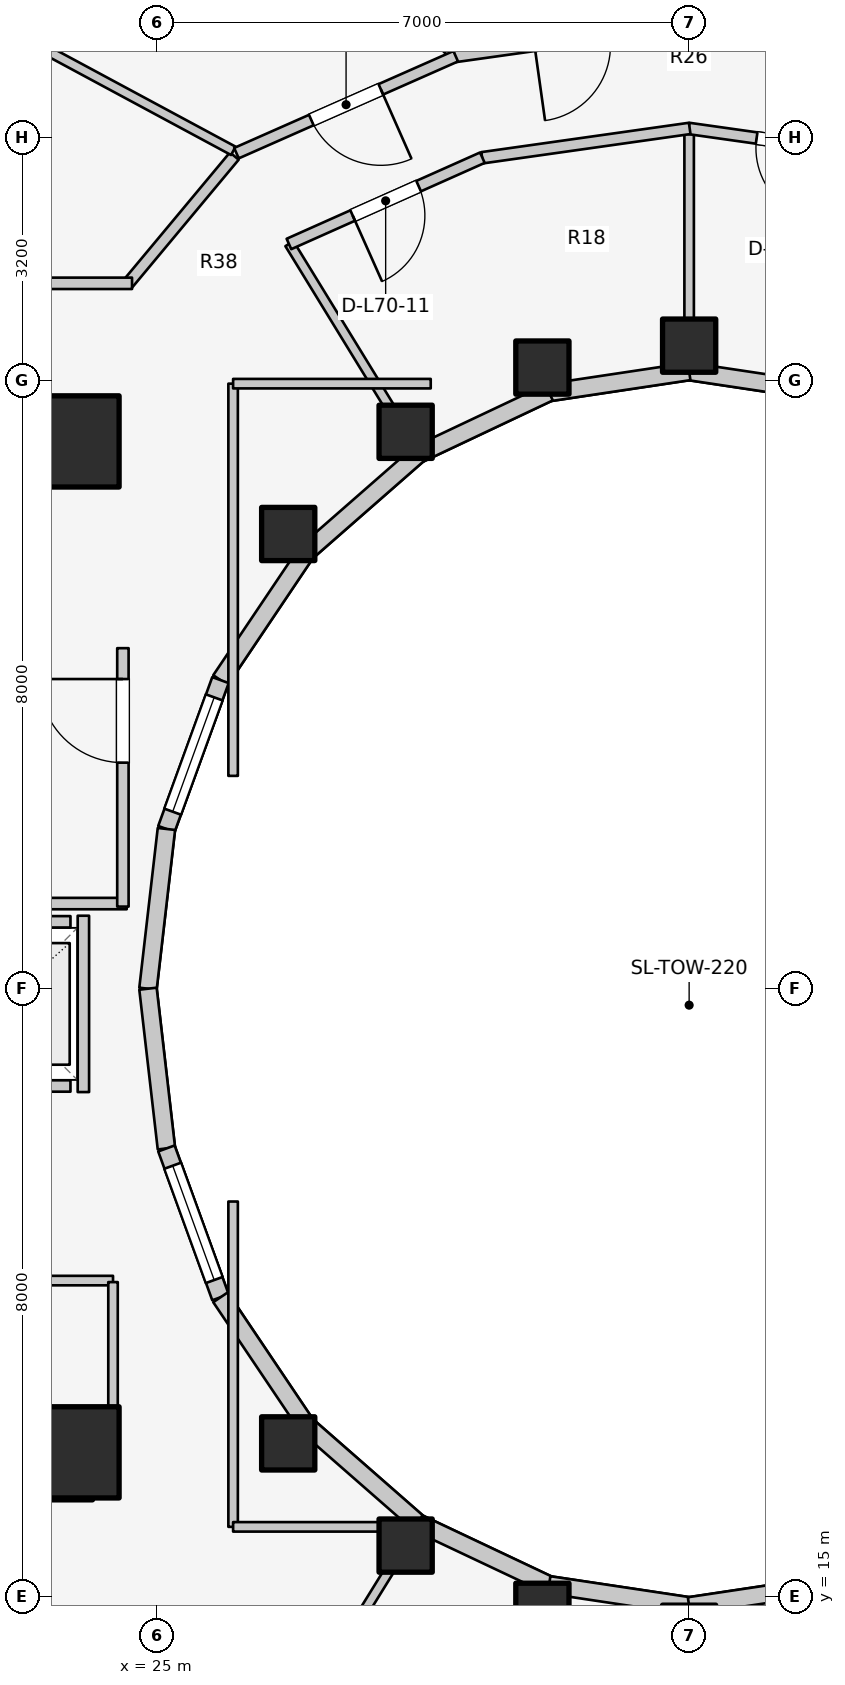
"""IFC4 building model, lengths in metres.
Left out: names, types, materials, properties, quantities, classifications, styles, units other than length and angle.
Written with IfcOpenShell. Run it as: python <this file> out.ifc"""

import sys

from ifc_helpers import new_model, si_unit, direction, frame, frame_2d, origin, origin_2d, place, context, subcontext, project, spatial, rectangle, extrude, element, fill, save


model = new_model("IFC4")
c1 = context("Model", 3, precision=1e-05, world=origin(), true_north=direction((0.0, 1.0)))
c2 = subcontext(c1, "Body", "Model", "MODEL_VIEW")
j1 = project(units=[si_unit("LENGTHUNIT", "METRE"), si_unit("PLANEANGLEUNIT", "RADIAN")], contexts=[c1])
p1 = place(None, origin())
s1 = spatial("IfcSite", under=j1, at=p1, CompositionType="ELEMENT")
p2 = place(p1, origin())
s2 = spatial("IfcBuilding", under=s1, at=p2, CompositionType="ELEMENT")
p3 = place(p2, frame((0.0, 0.0, 229.5)))
s3 = spatial("IfcBuildingStorey", under=s2, at=p3, CompositionType="ELEMENT", Elevation=229.5)
for number, where, z_axis, x_axis in (
    (1, (19.65, 16.55, 0.0), (0.0, 0.0, 1.0), (1.0, 0.0, 0.0)),
    (2, (19.65, 30.35, 0.0), (0.0, 0.0, 1.0), (1.0, 0.0, 0.0)),
):
    element("IfcWall", number, at=place(p3, frame(where, z_axis=z_axis, x_axis=x_axis)), inside=s3, PredefinedType="SHEAR", context=c2, shape_type="SweptSolid", body=[
        extrude(rectangle(XDim=4.5, YDim=0.55, at=frame_2d((2.25, 0.0))), origin(), (0.0, 0.0, 1.0), 3.1),
    ])
for number, where, z_axis, x_axis in (
    (3, (23.9, 16.9, 0.0), (0.0, 0.0, 1.0), (1.0, 0.0, 0.0)),
    (4, (23.9, 30.2, 0.0), (0.0, 0.0, 1.0), (1.0, 0.0, 0.0)),
):
    element("IfcColumn", number, at=place(p3, frame(where, z_axis=z_axis, x_axis=x_axis)), inside=s3, PredefinedType="COLUMN", context=c2, shape_type="SweptSolid", body=[
        extrude(rectangle(XDim=1.2, YDim=1.2, at=origin_2d()), origin(), (0.0, 0.0, 1.0), 3.1),
    ])
for number, where, z_axis, x_axis in (
    (5, (32.0, 31.46, 0.0), (0.0, 0.0, 1.0), (1.0, 0.0, 0.0)),
    (6, (30.069, 31.172, 0.0), (0.0, 0.0, 1.0), (1.0, 0.0, 0.0)),
    (7, (28.27, 30.327, 0.0), (0.0, 0.0, 1.0), (1.0, 0.0, 0.0)),
    (8, (26.725, 28.982, 0.0), (0.0, 0.0, 1.0), (1.0, 0.0, 0.0)),
    (9, (26.725, 17.018, 0.0), (0.0, 0.0, 1.0), (1.0, 0.0, 0.0)),
    (10, (28.27, 15.673, 0.0), (0.0, 0.0, 1.0), (1.0, 0.0, 0.0)),
    (11, (30.069, 14.828, 0.0), (0.0, 0.0, 1.0), (1.0, 0.0, 0.0)),
    (12, (32.0, 14.54, 0.0), (0.0, 0.0, 1.0), (1.0, 0.0, 0.0)),
):
    element("IfcColumn", number, at=place(p3, frame(where, z_axis=z_axis, x_axis=x_axis)), inside=s3, PredefinedType="COLUMN", context=c2, shape_type="SweptSolid", body=[
        extrude(rectangle(XDim=0.7, YDim=0.7, at=origin_2d()), origin(), (0.0, 0.0, 1.0), 3.1),
    ])
for number, where, z_axis, x_axis in (
    (13, (33.843, 30.843, 0.0), (0.0, 0.0, 1.0), (-0.989, 0.149, 0.0)),
    (14, (32.0, 31.12, 0.0), (0.0, 0.0, 1.0), (-0.989, -0.149, 0.0)),
):
    element("IfcWall", number, at=place(p3, frame(where, z_axis=z_axis, x_axis=x_axis)), inside=s3, PredefinedType="STANDARD", context=c2, shape_type="SweptSolid", body=[
        extrude(rectangle(XDim=1.864, YDim=0.23, at=frame_2d((0.932, 0.0))), origin(), (0.0, 0.0, 1.0), 2.16),
    ])
p4 = place(p3, frame((30.157, 30.843, 0.0), z_axis=(0.0, 0.0, 1.0), x_axis=(-0.904179699603, -0.427152280606, 0.0)))
e15 = element("IfcWall", 15, at=p4, inside=s3, PredefinedType="STANDARD", context=c2, shape_type="SweptSolid", body=[
    extrude(rectangle(XDim=1.899, YDim=0.23, at=frame_2d((0.95, 0.0))), origin(), (0.0, 0.0, 1.0), 2.16),
])
p5 = place(p3, frame((28.44, 30.032, 0.0), z_axis=(0.0, 0.0, 1.0), x_axis=(-0.752576694707, -0.658504607869, 0.0)))
e16 = element("IfcWall", 16, at=p5, inside=s3, PredefinedType="STANDARD", context=c2, shape_type="SweptSolid", body=[
    extrude(rectangle(XDim=1.959, YDim=0.23, at=frame_2d((0.98, 0.0))), origin(), (0.0, 0.0, 1.0), 2.16),
])
p6 = place(p3, frame((26.965, 28.742, 0.0), z_axis=(0.0, 0.0, 1.0), x_axis=(-0.558197800898, -0.829707909492, 0.0)))
e17 = element("IfcWall", 17, at=p6, inside=s3, PredefinedType="STANDARD", context=c2, shape_type="SweptSolid", body=[
    extrude(rectangle(XDim=2.027, YDim=0.23, at=frame_2d((1.013, 0.0))), origin(), (0.0, 0.0, 1.0), 2.16),
])
p7 = place(p3, frame((25.834, 27.06, 0.0), z_axis=(0.0, 0.0, 1.0), x_axis=(-0.341423187295, -0.93990968033, 0.0)))
e18 = element("IfcWall", 18, at=p7, inside=s3, PredefinedType="STANDARD", context=c2, shape_type="SweptSolid", body=[
    extrude(rectangle(XDim=2.084, YDim=0.23, at=frame_2d((1.042, 0.0))), origin(), (0.0, 0.0, 1.0), 2.84),
])
p8 = place(p7, frame((0.242, 0.0, 0.85)))
e19 = element("IfcOpeningElement", 19, at=p8, cuts=e18, PredefinedType="OPENING", context=c2, shape_type="SweptSolid", body=[
    extrude(rectangle(XDim=1.6, YDim=1.65, at=frame_2d((0.8, 0.825))), frame((0.0, 0.125, 0.0), z_axis=(0.0, -1.0, 0.0), x_axis=(1.0, 0.0, 0.0)), (0.0, 0.0, 1.0), 0.25),
])
for number, where, z_axis, x_axis in (
    (20, (25.123, 25.102, 0.0), (0.0, 0.0, 1.0), (-0.115, -0.993, 0.0)),
    (21, (24.88, 23.0, 0.0), (0.0, 0.0, 1.0), (0.115, -0.993, 0.0)),
):
    element("IfcWall", number, at=place(p3, frame(where, z_axis=z_axis, x_axis=x_axis)), inside=s3, PredefinedType="STANDARD", context=c2, shape_type="SweptSolid", body=[
        extrude(rectangle(XDim=2.115, YDim=0.23, at=frame_2d((1.058, 0.0))), origin(), (0.0, 0.0, 1.0), 2.84),
    ])
p9 = place(p3, frame((25.123, 20.898, 0.0), z_axis=(0.0, 0.0, 1.0), x_axis=(0.341423187295, -0.93990968033, 0.0)))
e22 = element("IfcWall", 22, at=p9, inside=s3, PredefinedType="STANDARD", context=c2, shape_type="SweptSolid", body=[
    extrude(rectangle(XDim=2.084, YDim=0.23, at=frame_2d((1.042, 0.0))), origin(), (0.0, 0.0, 1.0), 2.84),
])
p10 = place(p9, frame((0.242, 0.0, 0.85)))
e23 = element("IfcOpeningElement", 23, at=p10, cuts=e22, PredefinedType="OPENING", context=c2, shape_type="SweptSolid", body=[
    extrude(rectangle(XDim=1.6, YDim=1.65, at=frame_2d((0.8, 0.825))), frame((0.0, 0.125, 0.0), z_axis=(0.0, -1.0, 0.0), x_axis=(1.0, 0.0, 0.0)), (0.0, 0.0, 1.0), 0.25),
])
p11 = place(p3, frame((25.834, 18.94, 0.0), z_axis=(0.0, 0.0, 1.0), x_axis=(0.558197800898, -0.829707909492, 0.0)))
e24 = element("IfcWall", 24, at=p11, inside=s3, PredefinedType="STANDARD", context=c2, shape_type="SweptSolid", body=[
    extrude(rectangle(XDim=2.027, YDim=0.23, at=frame_2d((1.013, 0.0))), origin(), (0.0, 0.0, 1.0), 2.16),
])
p12 = place(p3, frame((26.965, 17.258, 0.0), z_axis=(0.0, 0.0, 1.0), x_axis=(0.752576694707, -0.658504607869, 0.0)))
e25 = element("IfcWall", 25, at=p12, inside=s3, PredefinedType="STANDARD", context=c2, shape_type="SweptSolid", body=[
    extrude(rectangle(XDim=1.959, YDim=0.23, at=frame_2d((0.98, 0.0))), origin(), (0.0, 0.0, 1.0), 2.16),
])
p13 = place(p3, frame((28.44, 15.968, 0.0), z_axis=(0.0, 0.0, 1.0), x_axis=(0.904179699603, -0.427152280606, 0.0)))
e26 = element("IfcWall", 26, at=p13, inside=s3, PredefinedType="STANDARD", context=c2, shape_type="SweptSolid", body=[
    extrude(rectangle(XDim=1.899, YDim=0.23, at=frame_2d((0.95, 0.0))), origin(), (0.0, 0.0, 1.0), 2.16),
])
for number, where, z_axis, x_axis in (
    (27, (30.157, 15.157, 0.0), (0.0, 0.0, 1.0), (0.989, -0.149, 0.0)),
    (28, (32.0, 14.88, 0.0), (0.0, 0.0, 1.0), (0.989, 0.149, 0.0)),
):
    element("IfcWall", number, at=place(p3, frame(where, z_axis=z_axis, x_axis=x_axis)), inside=s3, PredefinedType="STANDARD", context=c2, shape_type="SweptSolid", body=[
        extrude(rectangle(XDim=1.864, YDim=0.23, at=frame_2d((0.932, 0.0))), origin(), (0.0, 0.0, 1.0), 2.16),
    ])
p14 = place(p3, frame((22.04, 21.72, 0.0), z_axis=(0.0, 0.0, 1.0), x_axis=(1.0, 0.0, 0.0)))
e29 = element("IfcWall", 29, at=p14, inside=s3, PredefinedType="SOLIDWALL", context=c2, shape_type="SweptSolid", body=[
    extrude(rectangle(XDim=1.82, YDim=0.15, at=frame_2d((0.91, 0.0))), origin(), (0.0, 0.0, 1.0), 2.12),
])
p15 = place(p14, frame((0.36, 0.0, 0.0)))
e30 = element("IfcOpeningElement", 30, at=p15, cuts=e29, PredefinedType="OPENING", context=c2, shape_type="SweptSolid", body=[
    extrude(rectangle(XDim=1.1, YDim=2.1, at=frame_2d((0.55, 1.05))), frame((0.0, 0.085, 0.0), z_axis=(0.0, -1.0, 0.0), x_axis=(1.0, 0.0, 0.0)), (0.0, 0.0, 1.0), 0.17),
])
p16 = place(p3, frame((22.04, 23.88, 0.0), z_axis=(0.0, 0.0, 1.0), x_axis=(1.0, 0.0, 0.0)))
e31 = element("IfcWall", 31, at=p16, inside=s3, PredefinedType="SOLIDWALL", context=c2, shape_type="SweptSolid", body=[
    extrude(rectangle(XDim=1.82, YDim=0.15, at=frame_2d((0.91, 0.0))), origin(), (0.0, 0.0, 1.0), 2.12),
])
p17 = place(p3, frame((24.03, 21.64, 0.0), z_axis=(0.0, 0.0, 1.0), x_axis=(0.0, 1.0, 0.0)))
e32 = element("IfcWall", 32, at=p17, inside=s3, PredefinedType="SOLIDWALL", context=c2, shape_type="SweptSolid", body=[
    extrude(rectangle(XDim=2.32, YDim=0.15, at=frame_2d((1.16, 0.0))), origin(), (0.0, 0.0, 1.0), 2.12),
])
p18 = place(p3, frame((19.52, 24.12, 0.0), z_axis=(0.0, 0.0, 1.0), x_axis=(1.0, 0.0, 0.0)))
e33 = element("IfcWall", 33, at=p18, inside=s3, PredefinedType="PARTITIONING", context=c2, shape_type="SweptSolid", body=[
    extrude(rectangle(XDim=5.08, YDim=0.15, at=frame_2d((2.54, 0.0))), origin(), (0.0, 0.0, 1.0), 2.12),
])
p19 = place(p3, frame((24.55, 24.08, 0.0), z_axis=(0.0, 0.0, 1.0), x_axis=(0.0, 1.0, 0.0)))
e34 = element("IfcWall", 34, at=p19, inside=s3, PredefinedType="PARTITIONING", context=c2, shape_type="SweptSolid", body=[
    extrude(rectangle(XDim=3.4, YDim=0.15, at=frame_2d((1.7, 0.0))), origin(), (0.0, 0.0, 1.0), 2.855),
])
p20 = place(p19, frame((1.894, 0.0, 0.0)))
e35 = element("IfcOpeningElement", 35, at=p20, cuts=e34, PredefinedType="OPENING", context=c2, shape_type="SweptSolid", body=[
    extrude(rectangle(XDim=1.1, YDim=2.1, at=frame_2d((0.55, 1.05))), frame((0.0, 0.085, 0.0), z_axis=(0.0, -1.0, 0.0), x_axis=(1.0, 0.0, 0.0)), (0.0, 0.0, 1.0), 0.17),
])
p21 = place(p3, frame((19.55, 19.16, 0.0), z_axis=(0.0, 0.0, 1.0), x_axis=(1.0, 0.0, 0.0)))
e36 = element("IfcWall", 36, at=p21, inside=s3, PredefinedType="PARTITIONING", context=c2, shape_type="SweptSolid", body=[
    extrude(rectangle(XDim=4.87, YDim=0.125, at=frame_2d((2.435, 0.0))), origin(), (0.0, 0.0, 1.0), 2.12),
])
p22 = place(p21, frame((2.272, 0.0, 0.0)))
e37 = element("IfcOpeningElement", 37, at=p22, cuts=e36, PredefinedType="OPENING", context=c2, shape_type="SweptSolid", body=[
    extrude(rectangle(XDim=0.85, YDim=2.05, at=frame_2d((0.425, 1.025))), frame((0.0, 0.073, 0.0), z_axis=(0.0, -1.0, 0.0), x_axis=(1.0, 0.0, 0.0)), (0.0, 0.0, 1.0), 0.145),
])
p23 = place(p3, frame((24.42, 17.1, 0.0), z_axis=(0.0, 0.0, 1.0), x_axis=(0.0, 1.0, 0.0)))
e38 = element("IfcWall", 38, at=p23, inside=s3, PredefinedType="PARTITIONING", context=c2, shape_type="SweptSolid", body=[
    extrude(rectangle(XDim=2.04, YDim=0.125, at=frame_2d((1.02, 0.0))), origin(), (0.0, 0.0, 1.0), 2.232),
])
p24 = place(p3, frame((32.0, 31.1, 0.0), z_axis=(0.0, 0.0, 1.0), x_axis=(0.0, 1.0, 0.0)))
e39 = element("IfcWall", 39, at=p24, inside=s3, PredefinedType="PARTITIONING", context=c2, shape_type="SweptSolid", body=[
    extrude(rectangle(XDim=3.218, YDim=0.125, at=frame_2d((1.609, 0.0))), origin(), (0.0, 0.0, 1.0), 2.376),
])
p25 = place(p3, frame((28.45, 30.015, 0.0), z_axis=(0.0, 0.0, 1.0), x_axis=(-0.522763432117, 0.852477796802, 0.0)))
e40 = element("IfcWall", 40, at=p25, inside=s3, PredefinedType="PARTITIONING", context=c2, shape_type="SweptSolid", body=[
    extrude(rectangle(XDim=3.269, YDim=0.125, at=frame_2d((1.635, 0.0))), origin(), (0.0, 0.0, 1.0), 2.376),
])
p26 = place(p3, frame((34.724, 33.932, 0.0), z_axis=(0.0, 0.0, 1.0), x_axis=(-0.990150268487, 0.140008734782, 0.0)))
e41 = element("IfcWall", 41, at=p26, inside=s3, PredefinedType="PARTITIONING", context=c2, shape_type="SweptSolid", body=[
    extrude(rectangle(XDim=2.759, YDim=0.15, at=frame_2d((1.379, 0.0))), origin(), (0.0, 0.0, 1.0), 2.376),
])
p27 = place(p26, frame((0.904, 0.0, 0.0)))
e42 = element("IfcOpeningElement", 42, at=p27, cuts=e41, PredefinedType="OPENING", context=c2, shape_type="SweptSolid", body=[
    extrude(rectangle(XDim=0.95, YDim=2.1, at=frame_2d((0.475, 1.05))), frame((0.0, 0.085, 0.0), z_axis=(0.0, -1.0, 0.0), x_axis=(1.0, 0.0, 0.0)), (0.0, 0.0, 1.0), 0.17),
])
p28 = place(p3, frame((32.007, 34.318, 0.0), z_axis=(0.0, 0.0, 1.0), x_axis=(-0.990150268487, -0.140008734782, 0.0)))
e43 = element("IfcWall", 43, at=p28, inside=s3, PredefinedType="PARTITIONING", context=c2, shape_type="SweptSolid", body=[
    extrude(rectangle(XDim=2.759, YDim=0.15, at=frame_2d((1.379, 0.0))), origin(), (0.0, 0.0, 1.0), 2.376),
])
p29 = place(p3, frame((29.28, 33.933, 0.0), z_axis=(0.0, 0.0, 1.0), x_axis=(-0.913254317828, -0.407389924971, 0.0)))
e44 = element("IfcWall", 44, at=p29, inside=s3, PredefinedType="PARTITIONING", context=c2, shape_type="SweptSolid", body=[
    extrude(rectangle(XDim=2.787, YDim=0.15, at=frame_2d((1.393, 0.0))), origin(), (0.0, 0.0, 1.0), 2.376),
])
p30 = place(p29, frame((0.918, 0.0, 0.0)))
e45 = element("IfcOpeningElement", 45, at=p30, cuts=e44, PredefinedType="OPENING", context=c2, shape_type="SweptSolid", body=[
    extrude(rectangle(XDim=0.95, YDim=2.1, at=frame_2d((0.475, 1.05))), frame((0.0, 0.085, 0.0), z_axis=(0.0, -1.0, 0.0), x_axis=(1.0, 0.0, 0.0)), (0.0, 0.0, 1.0), 0.17),
])
p31 = place(p3, frame((28.45, 15.985, 0.0), z_axis=(0.0, 0.0, 1.0), x_axis=(-0.52592395012, -0.850531597702, 0.0)))
e46 = element("IfcWall", 46, at=p31, inside=s3, PredefinedType="PARTITIONING", context=c2, shape_type="SweptSolid", body=[
    extrude(rectangle(XDim=2.869, YDim=0.125, at=frame_2d((1.435, 0.0))), origin(), (0.0, 0.0, 1.0), 2.376),
])
p32 = place(p3, frame((32.0, 14.9, 0.0), z_axis=(0.0, 0.0, 1.0), x_axis=(0.0, -1.0, 0.0)))
e47 = element("IfcWall", 47, at=p32, inside=s3, PredefinedType="PARTITIONING", context=c2, shape_type="SweptSolid", body=[
    extrude(rectangle(XDim=2.818, YDim=0.125, at=frame_2d((1.409, 0.0))), origin(), (0.0, 0.0, 1.0), 2.376),
])
p33 = place(p3, frame((26.0, 25.8, 0.0), z_axis=(0.0, 0.0, 1.0), x_axis=(0.0, 1.0, 0.0)))
e48 = element("IfcWall", 48, at=p33, inside=s3, PredefinedType="PARTITIONING", context=c2, shape_type="SweptSolid", body=[
    extrude(rectangle(XDim=5.16, YDim=0.125, at=frame_2d((2.58, 0.0))), origin(), (0.0, 0.0, 1.0), 2.232),
])
p34 = place(p3, frame((26.0, 30.96, 0.0), z_axis=(0.0, 0.0, 1.0), x_axis=(1.0, 0.0, 0.0)))
e49 = element("IfcWall", 49, at=p34, inside=s3, PredefinedType="PARTITIONING", context=c2, shape_type="SweptSolid", body=[
    extrude(rectangle(XDim=2.6, YDim=0.125, at=frame_2d((1.3, 0.0))), origin(), (0.0, 0.0, 1.0), 2.376),
])
p35 = place(p3, frame((26.0, 15.92, 0.0), z_axis=(0.0, 0.0, 1.0), x_axis=(0.0, 1.0, 0.0)))
e50 = element("IfcWall", 50, at=p35, inside=s3, PredefinedType="PARTITIONING", context=c2, shape_type="SweptSolid", body=[
    extrude(rectangle(XDim=4.28, YDim=0.125, at=frame_2d((2.14, 0.0))), origin(), (0.0, 0.0, 1.0), 2.232),
])
p36 = place(p3, frame((26.0, 15.92, 0.0), z_axis=(0.0, 0.0, 1.0), x_axis=(1.0, 0.0, 0.0)))
e51 = element("IfcWall", 51, at=p36, inside=s3, PredefinedType="PARTITIONING", context=c2, shape_type="SweptSolid", body=[
    extrude(rectangle(XDim=2.6, YDim=0.125, at=frame_2d((1.3, 0.0))), origin(), (0.0, 0.0, 1.0), 2.232),
])
p37 = place(p3, frame((26.016, 33.955, 0.0), z_axis=(0.0, 0.0, 1.0), x_axis=(-0.64030392053, -0.76812166312, 0.0)))
e52 = element("IfcWall", 52, at=p37, inside=s3, PredefinedType="PARTITIONING", context=c2, shape_type="SweptSolid", body=[
    extrude(rectangle(XDim=2.21, YDim=0.15, at=frame_2d((1.105, 0.0))), origin(), (0.0, 0.0, 1.0), 2.376),
])
p38 = place(p3, frame((17.15, 32.28, 0.0), z_axis=(0.0, 0.0, 1.0), x_axis=(1.0, 0.0, 0.0)))
e53 = element("IfcWall", 53, at=p38, inside=s3, PredefinedType="PARTITIONING", context=c2, shape_type="SweptSolid", body=[
    extrude(rectangle(XDim=7.52, YDim=0.15, at=frame_2d((3.76, 0.0))), origin(), (0.0, 0.0, 1.0), 2.376),
])
p39 = place(p38, frame((1.3, 0.0, 0.0)))
e54 = element("IfcOpeningElement", 54, at=p39, cuts=e53, PredefinedType="OPENING", context=c2, shape_type="SweptSolid", body=[
    extrude(rectangle(XDim=0.9, YDim=2.1, at=frame_2d((0.45, 1.05))), frame((0.0, 0.085, 0.0), z_axis=(0.0, -1.0, 0.0), x_axis=(1.0, 0.0, 0.0)), (0.0, 0.0, 1.0), 0.17),
])
p40 = place(p3, frame((28.882, 35.304, 0.0), z_axis=(0.0, 0.0, 1.0), x_axis=(-0.702191571271, 0.711988059756, 0.0)))
e55 = element("IfcWall", 55, at=p40, inside=s3, PredefinedType="PARTITIONING", context=c2, shape_type="SweptSolid", body=[
    extrude(rectangle(XDim=5.184, YDim=0.125, at=frame_2d((2.592, 0.0))), origin(), (0.0, 0.0, 1.0), 2.376),
])
p41 = place(p3, frame((26.003, 34.023, 0.0), z_axis=(0.0, 0.0, 1.0), x_axis=(-0.880531534665, 0.473987569943, 0.0)))
e56 = element("IfcWall", 56, at=p41, inside=s3, PredefinedType="PARTITIONING", context=c2, shape_type="SweptSolid", body=[
    extrude(rectangle(XDim=6.096, YDim=0.125, at=frame_2d((3.048, 0.0))), origin(), (0.0, 0.0, 1.0), 2.376),
])
p42 = place(p3, frame((35.087, 35.263, 0.0), z_axis=(0.0, 0.0, 1.0), x_axis=(-0.990268690673, 0.139168675614, 0.0)))
e57 = element("IfcWall", 57, at=p42, inside=s3, PredefinedType="PARTITIONING", context=c2, shape_type="SweptSolid", body=[
    extrude(rectangle(XDim=3.126, YDim=0.15, at=frame_2d((1.563, 0.0))), origin(), (0.0, 0.0, 1.0), 2.376),
])
p43 = place(p42, frame((1.063, 0.0, 0.0)))
e58 = element("IfcOpeningElement", 58, at=p43, cuts=e57, PredefinedType="OPENING", context=c2, shape_type="SweptSolid", body=[
    extrude(rectangle(XDim=1.0, YDim=2.1, at=frame_2d((0.5, 1.05))), frame((0.0, 0.085, 0.0), z_axis=(0.0, -1.0, 0.0), x_axis=(1.0, 0.0, 0.0)), (0.0, 0.0, 1.0), 0.17),
])
p44 = place(p3, frame((32.008, 35.698, 0.0), z_axis=(0.0, 0.0, 1.0), x_axis=(-0.990268690673, -0.139168675614, 0.0)))
e59 = element("IfcWall", 59, at=p44, inside=s3, PredefinedType="PARTITIONING", context=c2, shape_type="SweptSolid", body=[
    extrude(rectangle(XDim=3.126, YDim=0.15, at=frame_2d((1.563, 0.0))), origin(), (0.0, 0.0, 1.0), 2.376),
])
p45 = place(p44, frame((1.063, 0.0, 0.0)))
e60 = element("IfcOpeningElement", 60, at=p45, cuts=e59, PredefinedType="OPENING", context=c2, shape_type="SweptSolid", body=[
    extrude(rectangle(XDim=1.0, YDim=2.1, at=frame_2d((0.5, 1.05))), frame((0.0, 0.085, 0.0), z_axis=(0.0, -1.0, 0.0), x_axis=(1.0, 0.0, 0.0)), (0.0, 0.0, 1.0), 0.17),
])
p46 = place(p3, frame((28.929, 35.268, 0.0), z_axis=(0.0, 0.0, 1.0), x_axis=(-0.914642679993, -0.404263240891, 0.0)))
e61 = element("IfcWall", 61, at=p46, inside=s3, PredefinedType="PARTITIONING", context=c2, shape_type="SweptSolid", body=[
    extrude(rectangle(XDim=3.154, YDim=0.15, at=frame_2d((1.577, 0.0))), origin(), (0.0, 0.0, 1.0), 2.376),
])
p47 = place(p46, frame((1.077, 0.0, 0.0)))
e62 = element("IfcOpeningElement", 62, at=p47, cuts=e61, PredefinedType="OPENING", context=c2, shape_type="SweptSolid", body=[
    extrude(rectangle(XDim=1.0, YDim=2.1, at=frame_2d((0.5, 1.05))), frame((0.0, 0.085, 0.0), z_axis=(0.0, -1.0, 0.0), x_axis=(1.0, 0.0, 0.0)), (0.0, 0.0, 1.0), 0.17),
])
p48 = place(p8, origin())
e63 = element("IfcWindow", 63, at=p48, inside=s3, PartitioningType="SINGLE_PANEL", PredefinedType="WINDOW", context=c2, shape_type="SweptSolid", body=[
    extrude(rectangle(XDim=1.6, YDim=1.65, at=frame_2d((0.8, 0.825))), frame((0.0, 0.03, 0.0), z_axis=(0.0, -1.0, 0.0), x_axis=(1.0, 0.0, 0.0)), (0.0, 0.0, 1.0), 0.06),
])
fill(e19, e63)
p49 = place(p10, origin())
e64 = element("IfcWindow", 64, at=p49, inside=s3, PartitioningType="SINGLE_PANEL", PredefinedType="WINDOW", context=c2, shape_type="SweptSolid", body=[
    extrude(rectangle(XDim=1.6, YDim=1.65, at=frame_2d((0.8, 0.825))), frame((0.0, 0.03, 0.0), z_axis=(0.0, -1.0, 0.0), x_axis=(1.0, 0.0, 0.0)), (0.0, 0.0, 1.0), 0.06),
])
fill(e23, e64)
p50 = place(p20, origin())
e65 = element("IfcDoor", 65, at=p50, inside=s3, OperationType="SINGLE_SWING_RIGHT", PredefinedType="DOOR", context=c2, shape_type="SweptSolid", body=[
    extrude(rectangle(XDim=1.1, YDim=2.1, at=frame_2d((0.55, 1.05))), frame((0.0, 0.025, 0.0), z_axis=(0.0, -1.0, 0.0), x_axis=(1.0, 0.0, 0.0)), (0.0, 0.0, 1.0), 0.05),
])
fill(e35, e65)
p51 = place(p27, origin())
e66 = element("IfcDoor", 66, at=p51, inside=s3, OperationType="SINGLE_SWING_LEFT", PredefinedType="DOOR", context=c2, shape_type="SweptSolid", body=[
    extrude(rectangle(XDim=0.95, YDim=2.1, at=frame_2d((0.475, 1.05))), frame((0.0, 0.025, 0.0), z_axis=(0.0, -1.0, 0.0), x_axis=(1.0, 0.0, 0.0)), (0.0, 0.0, 1.0), 0.05),
])
fill(e42, e66)
p52 = place(p30, origin())
e67 = element("IfcDoor", 67, at=p52, inside=s3, OperationType="SINGLE_SWING_RIGHT", PredefinedType="DOOR", context=c2, shape_type="SweptSolid", body=[
    extrude(rectangle(XDim=0.95, YDim=2.1, at=frame_2d((0.475, 1.05))), frame((0.0, 0.025, 0.0), z_axis=(0.0, -1.0, 0.0), x_axis=(1.0, 0.0, 0.0)), (0.0, 0.0, 1.0), 0.05),
])
fill(e45, e67)
p53 = place(p47, origin())
e68 = element("IfcDoor", 68, at=p53, inside=s3, OperationType="SINGLE_SWING_LEFT", PredefinedType="DOOR", context=c2, shape_type="SweptSolid", body=[
    extrude(rectangle(XDim=1.0, YDim=2.1, at=frame_2d((0.5, 1.05))), frame((0.0, 0.025, 0.0), z_axis=(0.0, -1.0, 0.0), x_axis=(1.0, 0.0, 0.0)), (0.0, 0.0, 1.0), 0.05),
])
fill(e62, e68)
save(model, sys.argv[1])
